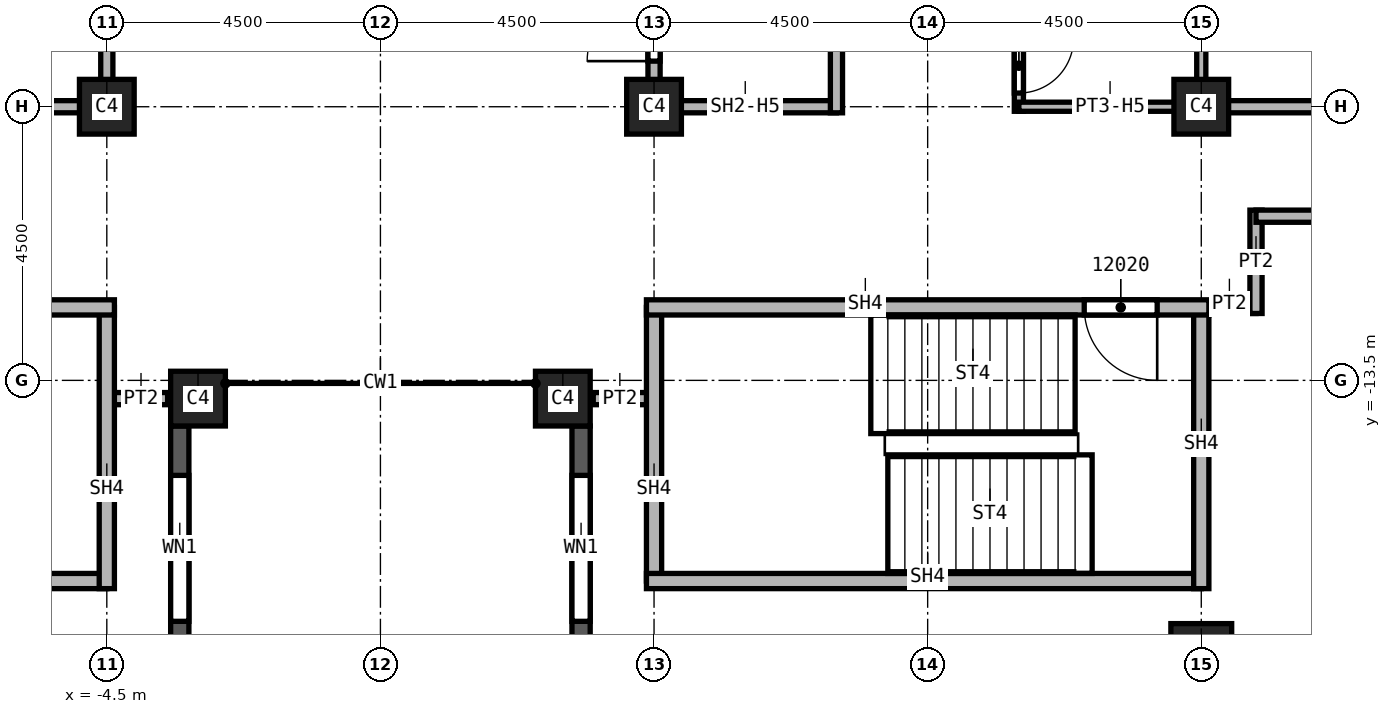
"""IFC4 building model, lengths in metres.
Left out: names, types, materials, properties, quantities, classifications, styles, units other than length and angle.
Written with IfcOpenShell. Run it as: python <this file> out.ifc"""

import sys

from ifc_helpers import new_model, si_unit, direction, frame, frame_2d, origin, origin_2d, place, context, subcontext, project, spatial, rectangle, extrude, element, fill, save


model = new_model("IFC4")
c1 = context("Model", 3, precision=1e-05, world=origin(), true_north=direction((0.0, 1.0)))
c2 = subcontext(c1, "Body", "Model", "MODEL_VIEW")
j1 = project(units=[si_unit("LENGTHUNIT", "METRE"), si_unit("PLANEANGLEUNIT", "RADIAN")], contexts=[c1])
p1 = place(None, origin())
s1 = spatial("IfcSite", under=j1, at=p1, CompositionType="ELEMENT")
p2 = place(p1, origin())
s2 = spatial("IfcBuilding", under=s1, at=p2, CompositionType="ELEMENT")
p3 = place(p2, frame((0.0, 0.0, 196.0)))
s3 = spatial("IfcBuildingStorey", under=s2, at=p3, CompositionType="ELEMENT", Elevation=196.0)
p4 = place(p3, frame((13.5, -18.0, 0.0), z_axis=(0.0, 0.0, 1.0), x_axis=(1.0, 0.0, 0.0)))
e1 = element("IfcColumn", 1, at=p4, inside=s3, PredefinedType="COLUMN", context=c2, shape_type="SweptSolid", body=[
    extrude(rectangle(XDim=1.0, YDim=1.0, at=origin_2d()), origin(), (0.0, 0.0, 1.0), 3.72),
])
for number, where, z_axis, x_axis in (
    (2, (4.5, -9.0, 0.0), (0.0, 0.0, 1.0), (1.0, 0.0, 0.0)),
    (3, (13.5, -9.0, 0.0), (0.0, 0.0, 1.0), (1.0, 0.0, 0.0)),
    (4, (-4.5, -9.0, 0.0), (0.0, 0.0, 1.0), (1.0, 0.0, 0.0)),
    (5, (3.0, -13.8, 0.0), (0.0, 0.0, 1.0), (1.0, 0.0, 0.0)),
    (6, (-3.0, -13.8, 0.0), (0.0, 0.0, 1.0), (1.0, 0.0, 0.0)),
):
    element("IfcColumn", number, at=place(p3, frame(where, z_axis=z_axis, x_axis=x_axis)), inside=s3, PredefinedType="COLUMN", context=c2, shape_type="SweptSolid", body=[
        extrude(rectangle(XDim=0.9, YDim=0.9, at=origin_2d()), origin(), (0.0, 0.0, 1.0), 3.72),
    ])
p5 = place(p3, frame((-3.3, -22.3, 0.0), z_axis=(0.0, 0.0, 1.0), x_axis=(0.0, 1.0, 0.0)))
e7 = element("IfcWall", 7, at=p5, inside=s3, PredefinedType="SOLIDWALL", context=c2, shape_type="SweptSolid", body=[
    extrude(rectangle(XDim=8.05, YDim=0.3, at=frame_2d((4.025, 0.0))), origin(), (0.0, 0.0, 1.0), 3.12),
])
p6 = place(p5, frame((0.812, 0.0, 0.8)))
e8 = element("IfcOpeningElement", 8, at=p6, cuts=e7, PredefinedType="OPENING", context=c2, shape_type="SweptSolid", body=[
    extrude(rectangle(XDim=2.4, YDim=1.95, at=frame_2d((1.2, 0.975))), frame((0.0, 0.15, 0.0), z_axis=(0.0, -1.0, 0.0), x_axis=(1.0, 0.0, 0.0)), (0.0, 0.0, 1.0), 0.3),
])
p7 = place(p5, frame((4.837, 0.0, 0.8)))
e9 = element("IfcOpeningElement", 9, at=p7, cuts=e7, PredefinedType="OPENING", context=c2, shape_type="SweptSolid", body=[
    extrude(rectangle(XDim=2.4, YDim=1.95, at=frame_2d((1.2, 0.975))), frame((0.0, 0.15, 0.0), z_axis=(0.0, -1.0, 0.0), x_axis=(1.0, 0.0, 0.0)), (0.0, 0.0, 1.0), 0.3),
])
p8 = place(p3, frame((3.3, -14.25, 0.0), z_axis=(0.0, 0.0, 1.0), x_axis=(0.0, -1.0, 0.0)))
e10 = element("IfcWall", 10, at=p8, inside=s3, PredefinedType="SOLIDWALL", context=c2, shape_type="SweptSolid", body=[
    extrude(rectangle(XDim=8.05, YDim=0.3, at=frame_2d((4.025, 0.0))), origin(), (0.0, 0.0, 1.0), 3.12),
])
p9 = place(p8, frame((0.812, 0.0, 0.8)))
e11 = element("IfcOpeningElement", 11, at=p9, cuts=e10, PredefinedType="OPENING", context=c2, shape_type="SweptSolid", body=[
    extrude(rectangle(XDim=2.4, YDim=1.95, at=frame_2d((1.2, 0.975))), frame((0.0, 0.15, 0.0), z_axis=(0.0, -1.0, 0.0), x_axis=(1.0, 0.0, 0.0)), (0.0, 0.0, 1.0), 0.3),
])
p10 = place(p8, frame((4.837, 0.0, 0.8)))
e12 = element("IfcOpeningElement", 12, at=p10, cuts=e10, PredefinedType="OPENING", context=c2, shape_type="SweptSolid", body=[
    extrude(rectangle(XDim=2.4, YDim=1.95, at=frame_2d((1.2, 0.975))), frame((0.0, 0.15, 0.0), z_axis=(0.0, -1.0, 0.0), x_axis=(1.0, 0.0, 0.0)), (0.0, 0.0, 1.0), 0.3),
])
for number, where, z_axis, x_axis in (
    (13, (-3.5, -13.8, 0.0), (0.0, 0.0, 1.0), (-1.0, 0.0, 0.0)),
    (14, (4.5, -13.8, 0.0), (0.0, 0.0, 1.0), (-1.0, 0.0, 0.0)),
):
    element("IfcWall", number, at=place(p3, frame(where, z_axis=z_axis, x_axis=x_axis)), inside=s3, PredefinedType="PARTITIONING", context=c2, shape_type="SweptSolid", body=[
        extrude(rectangle(XDim=1.0, YDim=0.2, at=frame_2d((0.5, 0.0))), origin(), (0.0, 0.0, 1.0), 3.72),
    ])
p11 = place(p3, frame((13.5, -9.0, 0.0), z_axis=(0.0, 0.0, 1.0), x_axis=(1.0, 0.0, 0.0)))
e15 = element("IfcWall", 15, at=p11, inside=s3, PredefinedType="PARTITIONING", context=c2, shape_type="SweptSolid", body=[
    extrude(rectangle(XDim=4.5, YDim=0.2, at=frame_2d((2.25, 0.0))), origin(), (0.0, 0.0, 1.0), 3.72),
])
p12 = place(p3, frame((14.4, -12.3, 0.0), z_axis=(0.0, 0.0, 1.0), x_axis=(-1.0, 0.0, 0.0)))
e16 = element("IfcWall", 16, at=p12, inside=s3, PredefinedType="PARTITIONING", context=c2, shape_type="SweptSolid", body=[
    extrude(rectangle(XDim=1.025, YDim=0.2, at=frame_2d((0.512, 0.0))), origin(), (0.0, 0.0, 1.0), 3.72),
])
p13 = place(p3, frame((14.4, -10.7, 0.0), z_axis=(0.0, 0.0, 1.0), x_axis=(0.0, -1.0, 0.0)))
e17 = element("IfcWall", 17, at=p13, inside=s3, PredefinedType="PARTITIONING", context=c2, shape_type="SweptSolid", body=[
    extrude(rectangle(XDim=1.7, YDim=0.2, at=frame_2d((0.85, 0.0))), origin(), (0.0, 0.0, 1.0), 3.72),
])
p14 = place(p3, frame((18.0, -10.8, 0.0), z_axis=(0.0, 0.0, 1.0), x_axis=(-1.0, 0.0, 0.0)))
e18 = element("IfcWall", 18, at=p14, inside=s3, PredefinedType="PARTITIONING", context=c2, shape_type="SweptSolid", body=[
    extrude(rectangle(XDim=3.6, YDim=0.2, at=frame_2d((1.8, 0.0))), origin(), (0.0, 0.0, 1.0), 3.72),
])
p15 = place(p3, frame((-4.5, -9.0, 0.0), z_axis=(0.0, 0.0, 1.0), x_axis=(-1.0, 0.0, 0.0)))
e19 = element("IfcWall", 19, at=p15, inside=s3, PredefinedType="SOLIDWALL", context=c2, shape_type="SweptSolid", body=[
    extrude(rectangle(XDim=3.0, YDim=0.2, at=frame_2d((1.5, 0.0))), origin(), (0.0, 0.0, 1.0), 2.958),
])
p16 = place(p3, frame((-4.5, 0.0, 0.0), z_axis=(0.0, 0.0, 1.0), x_axis=(0.0, -1.0, 0.0)))
e20 = element("IfcWall", 20, at=p16, inside=s3, PredefinedType="SOLIDWALL", context=c2, shape_type="SweptSolid", body=[
    extrude(rectangle(XDim=9.1, YDim=0.2, at=frame_2d((4.55, 0.0))), origin(), (0.0, 0.0, 1.0), 2.958),
])
p17 = place(p16, frame((6.25, 0.0, 0.0)))
e21 = element("IfcOpeningElement", 21, at=p17, cuts=e20, PredefinedType="OPENING", context=c2, shape_type="SweptSolid", body=[
    extrude(rectangle(XDim=1.1, YDim=2.1, at=frame_2d((0.55, 1.05))), frame((0.0, 0.1, 0.0), z_axis=(0.0, -1.0, 0.0), x_axis=(1.0, 0.0, 0.0)), (0.0, 0.0, 1.0), 0.2),
])
p18 = place(p16, frame((4.6, 0.0, 0.0)))
e22 = element("IfcOpeningElement", 22, at=p18, cuts=e20, PredefinedType="OPENING", context=c2, shape_type="SweptSolid", body=[
    extrude(rectangle(XDim=1.1, YDim=2.1, at=frame_2d((0.55, 1.05))), frame((0.0, 0.1, 0.0), z_axis=(0.0, -1.0, 0.0), x_axis=(1.0, 0.0, 0.0)), (0.0, 0.0, 1.0), 0.2),
])
p19 = place(p3, frame((4.5, -9.1, 0.0), z_axis=(0.0, 0.0, 1.0), x_axis=(0.0, 1.0, 0.0)))
e23 = element("IfcWall", 23, at=p19, inside=s3, PredefinedType="SOLIDWALL", context=c2, shape_type="SweptSolid", body=[
    extrude(rectangle(XDim=3.1, YDim=0.2, at=frame_2d((1.55, 0.0))), origin(), (0.0, 0.0, 1.0), 2.958),
])
p20 = place(p19, frame((0.85, 0.0, 0.0)))
e24 = element("IfcOpeningElement", 24, at=p20, cuts=e23, PredefinedType="OPENING", context=c2, shape_type="SweptSolid", body=[
    extrude(rectangle(XDim=1.1, YDim=2.1, at=frame_2d((0.55, 1.05))), frame((0.0, 0.1, 0.0), z_axis=(0.0, -1.0, 0.0), x_axis=(1.0, 0.0, 0.0)), (0.0, 0.0, 1.0), 0.2),
])
p21 = place(p3, frame((7.5, -9.0, 0.0), z_axis=(0.0, 0.0, 1.0), x_axis=(-1.0, 0.0, 0.0)))
e25 = element("IfcWall", 25, at=p21, inside=s3, PredefinedType="SOLIDWALL", context=c2, shape_type="SweptSolid", body=[
    extrude(rectangle(XDim=3.0, YDim=0.2, at=frame_2d((1.5, 0.0))), origin(), (0.0, 0.0, 1.0), 2.958),
])
p22 = place(p3, frame((7.5, -6.0, 0.0), z_axis=(0.0, 0.0, 1.0), x_axis=(0.0, -1.0, 0.0)))
e26 = element("IfcWall", 26, at=p22, inside=s3, PredefinedType="SOLIDWALL", context=c2, shape_type="SweptSolid", body=[
    extrude(rectangle(XDim=3.1, YDim=0.2, at=frame_2d((1.55, 0.0))), origin(), (0.0, 0.0, 1.0), 3.72),
])
p23 = place(p3, frame((-4.5, -16.8, 0.0), z_axis=(0.0, 0.0, 1.0), x_axis=(-1.0, 0.0, 0.0)))
e27 = element("IfcWall", 27, at=p23, inside=s3, PredefinedType="SOLIDWALL", context=c2, shape_type="SweptSolid", body=[
    extrude(rectangle(XDim=9.125, YDim=0.25, at=frame_2d((4.562, 0.0))), origin(), (0.0, 0.0, 1.0), 3.72),
])
p24 = place(p3, frame((-4.5, -12.3, 0.0), z_axis=(0.0, 0.0, 1.0), x_axis=(0.0, -1.0, 0.0)))
e28 = element("IfcWall", 28, at=p24, inside=s3, PredefinedType="SOLIDWALL", context=c2, shape_type="SweptSolid", body=[
    extrude(rectangle(XDim=4.625, YDim=0.25, at=frame_2d((2.312, 0.0))), origin(), (0.0, 0.0, 1.0), 3.72),
])
p25 = place(p3, frame((-4.375, -12.3, 0.0), z_axis=(0.0, 0.0, 1.0), x_axis=(-1.0, 0.0, 0.0)))
e29 = element("IfcWall", 29, at=p25, inside=s3, PredefinedType="SOLIDWALL", context=c2, shape_type="SweptSolid", body=[
    extrude(rectangle(XDim=9.25, YDim=0.25, at=frame_2d((4.625, 0.0))), origin(), (0.0, 0.0, 1.0), 3.72),
])
p26 = place(p25, frame((7.2, 0.0, 0.0)))
e30 = element("IfcOpeningElement", 30, at=p26, cuts=e29, PredefinedType="OPENING", context=c2, shape_type="SweptSolid", body=[
    extrude(rectangle(XDim=1.2, YDim=2.1, at=frame_2d((0.6, 1.05))), frame((0.0, 0.125, 0.0), z_axis=(0.0, -1.0, 0.0), x_axis=(1.0, 0.0, 0.0)), (0.0, 0.0, 1.0), 0.25),
])
p27 = place(p3, frame((4.5, -16.8, 0.0), z_axis=(0.0, 0.0, 1.0), x_axis=(0.0, 1.0, 0.0)))
e31 = element("IfcWall", 31, at=p27, inside=s3, PredefinedType="SOLIDWALL", context=c2, shape_type="SweptSolid", body=[
    extrude(rectangle(XDim=4.5, YDim=0.25, at=frame_2d((2.25, 0.0))), origin(), (0.0, 0.0, 1.0), 3.72),
])
p28 = place(p3, frame((13.5, -16.8, 0.0), z_axis=(0.0, 0.0, 1.0), x_axis=(-1.0, 0.0, 0.0)))
e32 = element("IfcWall", 32, at=p28, inside=s3, PredefinedType="SOLIDWALL", context=c2, shape_type="SweptSolid", body=[
    extrude(rectangle(XDim=9.125, YDim=0.25, at=frame_2d((4.562, 0.0))), origin(), (0.0, 0.0, 1.0), 3.72),
])
p29 = place(p3, frame((13.5, -12.3, 0.0), z_axis=(0.0, 0.0, 1.0), x_axis=(0.0, -1.0, 0.0)))
e33 = element("IfcWall", 33, at=p29, inside=s3, PredefinedType="SOLIDWALL", context=c2, shape_type="SweptSolid", body=[
    extrude(rectangle(XDim=4.625, YDim=0.25, at=frame_2d((2.312, 0.0))), origin(), (0.0, 0.0, 1.0), 3.72),
])
p30 = place(p3, frame((13.625, -12.3, 0.0), z_axis=(0.0, 0.0, 1.0), x_axis=(-1.0, 0.0, 0.0)))
e34 = element("IfcWall", 34, at=p30, inside=s3, PredefinedType="SOLIDWALL", context=c2, shape_type="SweptSolid", body=[
    extrude(rectangle(XDim=9.25, YDim=0.25, at=frame_2d((4.625, 0.0))), origin(), (0.0, 0.0, 1.0), 3.72),
])
p31 = place(p30, frame((0.85, 0.0, 0.0)))
e35 = element("IfcOpeningElement", 35, at=p31, cuts=e34, PredefinedType="OPENING", context=c2, shape_type="SweptSolid", body=[
    extrude(rectangle(XDim=1.2, YDim=2.1, at=frame_2d((0.6, 1.05))), frame((0.0, 0.125, 0.0), z_axis=(0.0, -1.0, 0.0), x_axis=(1.0, 0.0, 0.0)), (0.0, 0.0, 1.0), 0.25),
])
p32 = place(p3, frame((10.5, -4.925, 0.0), z_axis=(0.0, 0.0, 1.0), x_axis=(0.0, -1.0, 0.0)))
e36 = element("IfcWall", 36, at=p32, inside=s3, PredefinedType="PARTITIONING", context=c2, shape_type="SweptSolid", body=[
    extrude(rectangle(XDim=4.15, YDim=0.15, at=frame_2d((2.075, 0.0))), origin(), (0.0, 0.0, 1.0), 3.72),
])
p33 = place(p32, frame((2.95, 0.0, 0.0)))
e37 = element("IfcOpeningElement", 37, at=p33, cuts=e36, PredefinedType="OPENING", context=c2, shape_type="SweptSolid", body=[
    extrude(rectangle(XDim=0.9, YDim=2.1, at=frame_2d((0.45, 1.05))), frame((0.0, 0.075, 0.0), z_axis=(0.0, -1.0, 0.0), x_axis=(1.0, 0.0, 0.0)), (0.0, 0.0, 1.0), 0.15),
])
p34 = place(p3, frame((13.5, -5.0, 0.0), z_axis=(0.0, 0.0, 1.0), x_axis=(0.0, -1.0, 0.0)))
e38 = element("IfcWall", 38, at=p34, inside=s3, PredefinedType="PARTITIONING", context=c2, shape_type="SweptSolid", body=[
    extrude(rectangle(XDim=4.1, YDim=0.15, at=frame_2d((2.05, 0.0))), origin(), (0.0, 0.0, 1.0), 2.958),
])
p35 = place(p3, frame((13.575, -9.0, 0.0), z_axis=(0.0, 0.0, 1.0), x_axis=(-1.0, 0.0, 0.0)))
e39 = element("IfcWall", 39, at=p35, inside=s3, PredefinedType="PARTITIONING", context=c2, shape_type="SweptSolid", body=[
    extrude(rectangle(XDim=3.075, YDim=0.15, at=frame_2d((1.538, 0.0))), origin(), (0.0, 0.0, 1.0), 2.958),
])
p36 = place(p7, origin())
e40 = element("IfcWindow", 40, at=p36, inside=s3, PartitioningType="SINGLE_PANEL", PredefinedType="WINDOW", context=c2, shape_type="SweptSolid", body=[
    extrude(rectangle(XDim=2.4, YDim=1.95, at=frame_2d((1.2, 0.975))), frame((0.0, 0.03, 0.0), z_axis=(0.0, -1.0, 0.0), x_axis=(1.0, 0.0, 0.0)), (0.0, 0.0, 1.0), 0.06),
])
fill(e9, e40)
p37 = place(p9, origin())
e41 = element("IfcWindow", 41, at=p37, inside=s3, PartitioningType="SINGLE_PANEL", PredefinedType="WINDOW", context=c2, shape_type="SweptSolid", body=[
    extrude(rectangle(XDim=2.4, YDim=1.95, at=frame_2d((1.2, 0.975))), frame((0.0, 0.03, 0.0), z_axis=(0.0, -1.0, 0.0), x_axis=(1.0, 0.0, 0.0)), (0.0, 0.0, 1.0), 0.06),
])
fill(e11, e41)
p38 = place(p20, origin())
e42 = element("IfcDoor", 42, at=p38, inside=s3, OperationType="SINGLE_SWING_RIGHT", PredefinedType="DOOR", context=c2, shape_type="SweptSolid", body=[
    extrude(rectangle(XDim=1.1, YDim=2.1, at=frame_2d((0.55, 1.05))), frame((0.0, 0.025, 0.0), z_axis=(0.0, -1.0, 0.0), x_axis=(1.0, 0.0, 0.0)), (0.0, 0.0, 1.0), 0.05),
])
fill(e24, e42)
p39 = place(p33, origin())
e43 = element("IfcDoor", 43, at=p39, inside=s3, OperationType="SINGLE_SWING_LEFT", PredefinedType="DOOR", context=c2, shape_type="SweptSolid", body=[
    extrude(rectangle(XDim=0.9, YDim=2.1, at=frame_2d((0.45, 1.05))), frame((0.0, 0.025, 0.0), z_axis=(0.0, -1.0, 0.0), x_axis=(1.0, 0.0, 0.0)), (0.0, 0.0, 1.0), 0.05),
])
fill(e37, e43)
p40 = place(p31, origin())
e44 = element("IfcDoor", 44, at=p40, inside=s3, OperationType="SINGLE_SWING_LEFT", PredefinedType="DOOR", context=c2, shape_type="SweptSolid", body=[
    extrude(rectangle(XDim=1.2, YDim=2.1, at=frame_2d((0.6, 1.05))), frame((0.0, 0.025, 0.0), z_axis=(0.0, -1.0, 0.0), x_axis=(1.0, 0.0, 0.0)), (0.0, 0.0, 1.0), 0.05),
])
fill(e35, e44)
save(model, sys.argv[1])
